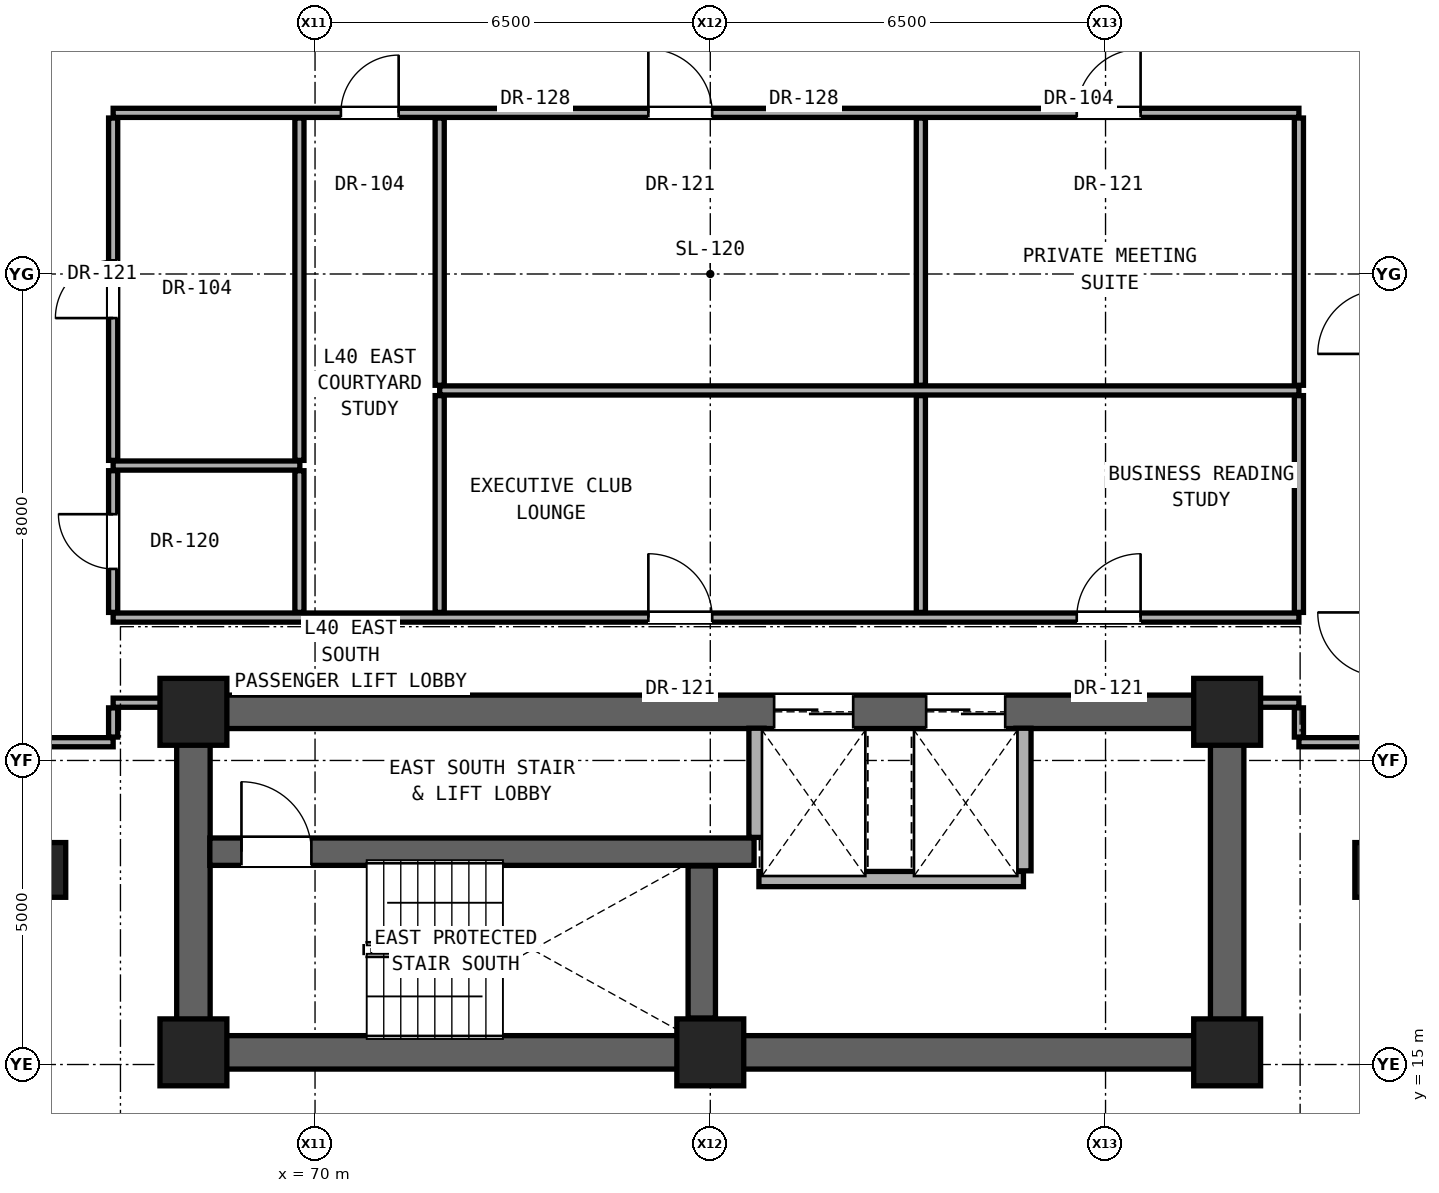
"""IFC4 building model, lengths in metres.
Left out: names, types, materials, properties, quantities, classifications, styles, units other than length and angle.
Written with IfcOpenShell. Run it as: python <this file> out.ifc"""

import sys

from ifc_helpers import new_model, si_unit, direction, frame, frame_2d, origin, origin_2d, place, context, subcontext, project, spatial, rectangle, extrude, element, fill, save


model = new_model("IFC4")
c1 = context("Model", 3, precision=1e-05, world=origin(), true_north=direction((0.0, 1.0)))
c2 = subcontext(c1, "Body", "Model", "MODEL_VIEW")
j1 = project(units=[si_unit("LENGTHUNIT", "METRE"), si_unit("PLANEANGLEUNIT", "RADIAN")], contexts=[c1])
p1 = place(None, origin())
s1 = spatial("IfcSite", under=j1, at=p1, CompositionType="ELEMENT")
p2 = place(p1, origin())
s2 = spatial("IfcBuilding", under=s1, at=p2, CompositionType="ELEMENT")
p3 = place(p2, frame((0.0, 0.0, 141.2)))
s3 = spatial("IfcBuildingStorey", under=s2, at=p3, CompositionType="ELEMENT", Elevation=141.2)
for number, where, z_axis, x_axis in (
    (1, (68.0, 15.2, 0.0), (0.0, 0.0, 1.0), (1.0, 0.0, 0.0)),
    (2, (76.5, 15.2, 0.0), (0.0, 0.0, 1.0), (1.0, 0.0, 0.0)),
    (3, (85.0, 15.2, 0.0), (0.0, 0.0, 1.0), (1.0, 0.0, 0.0)),
    (4, (68.0, 20.8, 0.0), (0.0, 0.0, 1.0), (1.0, 0.0, 0.0)),
    (5, (85.0, 20.8, 0.0), (0.0, 0.0, 1.0), (1.0, 0.0, 0.0)),
):
    element("IfcColumn", number, at=place(p3, frame(where, z_axis=z_axis, x_axis=x_axis)), inside=s3, PredefinedType="COLUMN", context=c2, shape_type="SweptSolid", body=[
        extrude(rectangle(XDim=1.1, YDim=1.1, at=origin_2d()), origin(), (0.0, 0.0, 1.0), 3.3),
    ])
for number, where, z_axis, x_axis in (
    (6, (65.6, 18.2, 0.0), (0.0, 0.0, 1.0), (1.0, 0.0, 0.0)),
    (7, (87.4, 18.2, 0.0), (0.0, 0.0, 1.0), (1.0, 0.0, 0.0)),
):
    element("IfcColumn", number, at=place(p3, frame(where, z_axis=z_axis, x_axis=x_axis)), inside=s3, PredefinedType="PILASTER", context=c2, shape_type="SweptSolid", body=[
        extrude(rectangle(XDim=0.6, YDim=0.9, at=origin_2d()), origin(), (0.0, 0.0, 1.0), 3.3),
    ])
p4 = place(p3, frame((68.0, 15.2, 0.0), z_axis=(0.0, 0.0, 1.0), x_axis=(1.0, 0.0, 0.0)))
e8 = element("IfcWall", 8, at=p4, inside=s3, PredefinedType="SHEAR", context=c2, shape_type="SweptSolid", body=[
    extrude(rectangle(XDim=17.0, YDim=0.55, at=frame_2d((8.5, 0.0))), origin(), (0.0, 0.0, 1.0), 3.08),
])
for number, where, z_axis, x_axis in (
    (9, (68.0, 15.2, 0.0), (0.0, 0.0, 1.0), (0.0, 1.0, 0.0)),
    (10, (85.0, 15.2, 0.0), (0.0, 0.0, 1.0), (0.0, 1.0, 0.0)),
):
    element("IfcWall", number, at=place(p3, frame(where, z_axis=z_axis, x_axis=x_axis)), inside=s3, PredefinedType="SHEAR", context=c2, shape_type="SweptSolid", body=[
        extrude(rectangle(XDim=5.6, YDim=0.55, at=frame_2d((2.8, 0.0))), origin(), (0.0, 0.0, 1.0), 3.08),
    ])
p5 = place(p3, frame((68.0, 20.8, 0.0), z_axis=(0.0, 0.0, 1.0), x_axis=(1.0, 0.0, 0.0)))
e11 = element("IfcWall", 11, at=p5, inside=s3, PredefinedType="SHEAR", context=c2, shape_type="SweptSolid", body=[
    extrude(rectangle(XDim=17.0, YDim=0.55, at=frame_2d((8.5, 0.0))), origin(), (0.0, 0.0, 1.0), 3.08),
])
p6 = place(p5, frame((9.55, 0.0, 0.0)))
e12 = element("IfcOpeningElement", 12, at=p6, cuts=e11, PredefinedType="OPENING", context=c2, shape_type="SweptSolid", body=[
    extrude(rectangle(XDim=1.3, YDim=2.3, at=frame_2d((0.65, 1.15))), frame((0.0, 0.285, 0.0), z_axis=(0.0, -1.0, 0.0), x_axis=(1.0, 0.0, 0.0)), (0.0, 0.0, 1.0), 0.57),
])
p7 = place(p5, frame((12.05, 0.0, 0.0)))
e13 = element("IfcOpeningElement", 13, at=p7, cuts=e11, PredefinedType="OPENING", context=c2, shape_type="SweptSolid", body=[
    extrude(rectangle(XDim=1.3, YDim=2.3, at=frame_2d((0.65, 1.15))), frame((0.0, 0.285, 0.0), z_axis=(0.0, -1.0, 0.0), x_axis=(1.0, 0.0, 0.0)), (0.0, 0.0, 1.0), 0.57),
])
p8 = place(p3, frame((77.3, 18.05, 0.0), z_axis=(0.0, 0.0, 1.0), x_axis=(1.0, 0.0, 0.0)))
e14 = element("IfcWall", 14, at=p8, inside=s3, PredefinedType="SOLIDWALL", context=c2, shape_type="SweptSolid", body=[
    extrude(rectangle(XDim=4.35, YDim=0.25, at=frame_2d((2.175, 0.0))), origin(), (0.0, 0.0, 1.0), 3.08),
])
p9 = place(p3, frame((68.27, 18.5, 0.0), z_axis=(0.0, 0.0, 1.0), x_axis=(1.0, 0.0, 0.0)))
e15 = element("IfcWall", 15, at=p9, inside=s3, PredefinedType="SHEAR", context=c2, shape_type="SweptSolid", body=[
    extrude(rectangle(XDim=8.95, YDim=0.45, at=frame_2d((4.475, 0.0))), origin(), (0.0, 0.0, 1.0), 3.08),
])
p10 = place(p9, frame((0.52, 0.0, 0.0)))
e16 = element("IfcOpeningElement", 16, at=p10, cuts=e15, PredefinedType="OPENING", context=c2, shape_type="SweptSolid", body=[
    extrude(rectangle(XDim=1.15, YDim=2.2, at=frame_2d((0.575, 1.1))), frame((0.0, 0.235, 0.0), z_axis=(0.0, -1.0, 0.0), x_axis=(1.0, 0.0, 0.0)), (0.0, 0.0, 1.0), 0.47),
])
p11 = place(p3, frame((65.32, 20.3, 0.0), z_axis=(0.0, 0.0, 1.0), x_axis=(1.0, 0.0, 0.0)))
e17 = element("IfcWall", 17, at=p11, inside=s3, PredefinedType="PARTITIONING", context=c2, shape_type="SweptSolid", body=[
    extrude(rectangle(XDim=1.36, YDim=0.15, at=frame_2d((0.68, 0.0))), origin(), (0.0, 0.0, 1.0), 3.08),
])
p12 = place(p3, frame((86.18, 20.3, 0.0), z_axis=(0.0, 0.0, 1.0), x_axis=(1.0, 0.0, 0.0)))
e18 = element("IfcWall", 18, at=p12, inside=s3, PredefinedType="PARTITIONING", context=c2, shape_type="SweptSolid", body=[
    extrude(rectangle(XDim=1.36, YDim=0.15, at=frame_2d((0.68, 0.0))), origin(), (0.0, 0.0, 1.0), 3.08),
])
p13 = place(p3, frame((66.68, 20.95, 0.0), z_axis=(0.0, 0.0, 1.0), x_axis=(1.0, 0.0, 0.0)))
e19 = element("IfcWall", 19, at=p13, inside=s3, PredefinedType="PARTITIONING", context=c2, shape_type="SweptSolid", body=[
    extrude(rectangle(XDim=1.05, YDim=0.15, at=frame_2d((0.525, 0.0))), origin(), (0.0, 0.0, 1.0), 2.472),
])
p14 = place(p3, frame((85.27, 20.95, 0.0), z_axis=(0.0, 0.0, 1.0), x_axis=(1.0, 0.0, 0.0)))
e20 = element("IfcWall", 20, at=p14, inside=s3, PredefinedType="PARTITIONING", context=c2, shape_type="SweptSolid", body=[
    extrude(rectangle(XDim=0.91, YDim=0.15, at=frame_2d((0.455, 0.0))), origin(), (0.0, 0.0, 1.0), 2.472),
])
p15 = place(p3, frame((66.68, 22.35, 0.0), z_axis=(0.0, 0.0, 1.0), x_axis=(1.0, 0.0, 0.0)))
e21 = element("IfcWall", 21, at=p15, inside=s3, PredefinedType="PARTITIONING", context=c2, shape_type="SweptSolid", body=[
    extrude(rectangle(XDim=19.5, YDim=0.15, at=frame_2d((9.75, 0.0))), origin(), (0.0, 0.0, 1.0), 2.216),
])
p16 = place(p15, frame((8.802, 0.0, 0.0)))
e22 = element("IfcOpeningElement", 22, at=p16, cuts=e21, PredefinedType="OPENING", context=c2, shape_type="SweptSolid", body=[
    extrude(rectangle(XDim=1.05, YDim=2.2, at=frame_2d((0.525, 1.1))), frame((0.0, 0.085, 0.0), z_axis=(0.0, -1.0, 0.0), x_axis=(1.0, 0.0, 0.0)), (0.0, 0.0, 1.0), 0.17),
])
p17 = place(p15, frame((15.846, 0.0, 0.0)))
e23 = element("IfcOpeningElement", 23, at=p17, cuts=e21, PredefinedType="OPENING", context=c2, shape_type="SweptSolid", body=[
    extrude(rectangle(XDim=1.05, YDim=2.2, at=frame_2d((0.525, 1.1))), frame((0.0, 0.085, 0.0), z_axis=(0.0, -1.0, 0.0), x_axis=(1.0, 0.0, 0.0)), (0.0, 0.0, 1.0), 0.17),
])
p18 = place(p3, frame((66.68, 24.85, 0.0), z_axis=(0.0, 0.0, 1.0), x_axis=(1.0, 0.0, 0.0)))
e24 = element("IfcWall", 24, at=p18, inside=s3, PredefinedType="PARTITIONING", context=c2, shape_type="SweptSolid", body=[
    extrude(rectangle(XDim=3.07, YDim=0.15, at=frame_2d((1.535, 0.0))), origin(), (0.0, 0.0, 1.0), 2.216),
])
p19 = place(p3, frame((72.05, 26.085, 0.0), z_axis=(0.0, 0.0, 1.0), x_axis=(1.0, 0.0, 0.0)))
e25 = element("IfcWall", 25, at=p19, inside=s3, PredefinedType="PARTITIONING", context=c2, shape_type="SweptSolid", body=[
    extrude(rectangle(XDim=14.13, YDim=0.15, at=frame_2d((7.065, 0.0))), origin(), (0.0, 0.0, 1.0), 2.216),
])
p20 = place(p3, frame((66.68, 30.65, 0.0), z_axis=(0.0, 0.0, 1.0), x_axis=(1.0, 0.0, 0.0)))
e26 = element("IfcWall", 26, at=p20, inside=s3, PredefinedType="PARTITIONING", context=c2, shape_type="SweptSolid", body=[
    extrude(rectangle(XDim=19.5, YDim=0.15, at=frame_2d((9.75, 0.0))), origin(), (0.0, 0.0, 1.0), 2.216),
])
p21 = place(p20, frame((3.745, 0.0, 0.0)))
e27 = element("IfcOpeningElement", 27, at=p21, cuts=e26, PredefinedType="OPENING", context=c2, shape_type="SweptSolid", body=[
    extrude(rectangle(XDim=0.95, YDim=2.15, at=frame_2d((0.475, 1.075))), frame((0.0, 0.085, 0.0), z_axis=(0.0, -1.0, 0.0), x_axis=(1.0, 0.0, 0.0)), (0.0, 0.0, 1.0), 0.17),
])
p22 = place(p20, frame((8.802, 0.0, 0.0)))
e28 = element("IfcOpeningElement", 28, at=p22, cuts=e26, PredefinedType="OPENING", context=c2, shape_type="SweptSolid", body=[
    extrude(rectangle(XDim=1.05, YDim=2.2, at=frame_2d((0.525, 1.1))), frame((0.0, 0.085, 0.0), z_axis=(0.0, -1.0, 0.0), x_axis=(1.0, 0.0, 0.0)), (0.0, 0.0, 1.0), 0.17),
])
p23 = place(p20, frame((15.846, 0.0, 0.0)))
e29 = element("IfcOpeningElement", 29, at=p23, cuts=e26, PredefinedType="OPENING", context=c2, shape_type="SweptSolid", body=[
    extrude(rectangle(XDim=1.05, YDim=2.2, at=frame_2d((0.525, 1.1))), frame((0.0, 0.085, 0.0), z_axis=(0.0, -1.0, 0.0), x_axis=(1.0, 0.0, 0.0)), (0.0, 0.0, 1.0), 0.17),
])
p24 = place(p3, frame((66.68, 20.385, 0.0), z_axis=(0.0, 0.0, 1.0), x_axis=(0.0, 1.0, 0.0)))
e30 = element("IfcWall", 30, at=p24, inside=s3, PredefinedType="PARTITIONING", context=c2, shape_type="SweptSolid", body=[
    extrude(rectangle(XDim=0.48, YDim=0.15, at=frame_2d((0.24, 0.0))), origin(), (0.0, 0.0, 1.0), 2.472),
])
p25 = place(p3, frame((66.68, 22.435, 0.0), z_axis=(0.0, 0.0, 1.0), x_axis=(0.0, 1.0, 0.0)))
e31 = element("IfcWall", 31, at=p25, inside=s3, PredefinedType="PARTITIONING", context=c2, shape_type="SweptSolid", body=[
    extrude(rectangle(XDim=2.33, YDim=0.15, at=frame_2d((1.165, 0.0))), origin(), (0.0, 0.0, 1.0), 3.08),
])
p26 = place(p25, frame((0.715, 0.0, 0.0)))
e32 = element("IfcOpeningElement", 32, at=p26, cuts=e31, PredefinedType="OPENING", context=c2, shape_type="SweptSolid", body=[
    extrude(rectangle(XDim=0.9, YDim=2.1, at=frame_2d((0.45, 1.05))), frame((0.0, 0.085, 0.0), z_axis=(0.0, -1.0, 0.0), x_axis=(1.0, 0.0, 0.0)), (0.0, 0.0, 1.0), 0.17),
])
p27 = place(p3, frame((66.68, 24.935, 0.0), z_axis=(0.0, 0.0, 1.0), x_axis=(0.0, 1.0, 0.0)))
e33 = element("IfcWall", 33, at=p27, inside=s3, PredefinedType="PARTITIONING", context=c2, shape_type="SweptSolid", body=[
    extrude(rectangle(XDim=5.63, YDim=0.15, at=frame_2d((2.815, 0.0))), origin(), (0.0, 0.0, 1.0), 2.376),
])
p28 = place(p27, frame((2.34, 0.0, 0.0)))
e34 = element("IfcOpeningElement", 34, at=p28, cuts=e33, PredefinedType="OPENING", context=c2, shape_type="SweptSolid", body=[
    extrude(rectangle(XDim=0.95, YDim=2.15, at=frame_2d((0.475, 1.075))), frame((0.0, 0.085, 0.0), z_axis=(0.0, -1.0, 0.0), x_axis=(1.0, 0.0, 0.0)), (0.0, 0.0, 1.0), 0.17),
])
p29 = place(p3, frame((69.743, 22.435, 0.0), z_axis=(0.0, 0.0, 1.0), x_axis=(0.0, 1.0, 0.0)))
e35 = element("IfcWall", 35, at=p29, inside=s3, PredefinedType="PARTITIONING", context=c2, shape_type="SweptSolid", body=[
    extrude(rectangle(XDim=2.33, YDim=0.15, at=frame_2d((1.165, 0.0))), origin(), (0.0, 0.0, 1.0), 3.08),
])
p30 = place(p3, frame((69.743, 24.935, 0.0), z_axis=(0.0, 0.0, 1.0), x_axis=(0.0, 1.0, 0.0)))
e36 = element("IfcWall", 36, at=p30, inside=s3, PredefinedType="PARTITIONING", context=c2, shape_type="SweptSolid", body=[
    extrude(rectangle(XDim=5.63, YDim=0.15, at=frame_2d((2.815, 0.0))), origin(), (0.0, 0.0, 1.0), 2.216),
])
p31 = place(p3, frame((72.05, 22.435, 0.0), z_axis=(0.0, 0.0, 1.0), x_axis=(0.0, 1.0, 0.0)))
e37 = element("IfcWall", 37, at=p31, inside=s3, PredefinedType="PARTITIONING", context=c2, shape_type="SweptSolid", body=[
    extrude(rectangle(XDim=3.565, YDim=0.15, at=frame_2d((1.782, 0.0))), origin(), (0.0, 0.0, 1.0), 3.08),
])
p32 = place(p3, frame((72.05, 26.17, 0.0), z_axis=(0.0, 0.0, 1.0), x_axis=(0.0, 1.0, 0.0)))
e38 = element("IfcWall", 38, at=p32, inside=s3, PredefinedType="PARTITIONING", context=c2, shape_type="SweptSolid", body=[
    extrude(rectangle(XDim=4.395, YDim=0.15, at=frame_2d((2.198, 0.0))), origin(), (0.0, 0.0, 1.0), 2.216),
])
p33 = place(p3, frame((76.36, 15.765, 0.0), z_axis=(0.0, 0.0, 1.0), x_axis=(0.0, 1.0, 0.0)))
e39 = element("IfcWall", 39, at=p33, inside=s3, PredefinedType="SHEAR", context=c2, shape_type="SweptSolid", body=[
    extrude(rectangle(XDim=2.5, YDim=0.45, at=frame_2d((1.25, 0.0))), origin(), (0.0, 0.0, 1.0), 3.08),
])
p34 = place(p3, frame((77.26, 18.735, 0.0), z_axis=(0.0, 0.0, 1.0), x_axis=(0.0, 1.0, 0.0)))
e40 = element("IfcWall", 40, at=p34, inside=s3, PredefinedType="SOLIDWALL", context=c2, shape_type="SweptSolid", body=[
    extrude(rectangle(XDim=1.795, YDim=0.25, at=frame_2d((0.897, 0.0))), origin(), (0.0, 0.0, 1.0), 3.08),
])
p35 = place(p3, frame((79.963, 22.435, 0.0), z_axis=(0.0, 0.0, 1.0), x_axis=(0.0, 1.0, 0.0)))
e41 = element("IfcWall", 41, at=p35, inside=s3, PredefinedType="PARTITIONING", context=c2, shape_type="SweptSolid", body=[
    extrude(rectangle(XDim=3.565, YDim=0.15, at=frame_2d((1.782, 0.0))), origin(), (0.0, 0.0, 1.0), 3.08),
])
p36 = place(p3, frame((79.963, 26.17, 0.0), z_axis=(0.0, 0.0, 1.0), x_axis=(0.0, 1.0, 0.0)))
e42 = element("IfcWall", 42, at=p36, inside=s3, PredefinedType="PARTITIONING", context=c2, shape_type="SweptSolid", body=[
    extrude(rectangle(XDim=4.395, YDim=0.15, at=frame_2d((2.198, 0.0))), origin(), (0.0, 0.0, 1.0), 2.216),
])
p37 = place(p3, frame((81.65, 18.185, 0.0), z_axis=(0.0, 0.0, 1.0), x_axis=(0.0, 1.0, 0.0)))
e43 = element("IfcWall", 43, at=p37, inside=s3, PredefinedType="SOLIDWALL", context=c2, shape_type="SweptSolid", body=[
    extrude(rectangle(XDim=2.345, YDim=0.25, at=frame_2d((1.172, 0.0))), origin(), (0.0, 0.0, 1.0), 3.08),
])
p38 = place(p3, frame((86.18, 20.385, 0.0), z_axis=(0.0, 0.0, 1.0), x_axis=(0.0, 1.0, 0.0)))
e44 = element("IfcWall", 44, at=p38, inside=s3, PredefinedType="PARTITIONING", context=c2, shape_type="SweptSolid", body=[
    extrude(rectangle(XDim=0.48, YDim=0.15, at=frame_2d((0.24, 0.0))), origin(), (0.0, 0.0, 1.0), 2.472),
])
p39 = place(p3, frame((86.18, 22.435, 0.0), z_axis=(0.0, 0.0, 1.0), x_axis=(0.0, 1.0, 0.0)))
e45 = element("IfcWall", 45, at=p39, inside=s3, PredefinedType="PARTITIONING", context=c2, shape_type="SweptSolid", body=[
    extrude(rectangle(XDim=3.565, YDim=0.15, at=frame_2d((1.782, 0.0))), origin(), (0.0, 0.0, 1.0), 3.08),
])
p40 = place(p3, frame((86.18, 26.17, 0.0), z_axis=(0.0, 0.0, 1.0), x_axis=(0.0, 1.0, 0.0)))
e46 = element("IfcWall", 46, at=p40, inside=s3, PredefinedType="PARTITIONING", context=c2, shape_type="SweptSolid", body=[
    extrude(rectangle(XDim=4.395, YDim=0.15, at=frame_2d((2.198, 0.0))), origin(), (0.0, 0.0, 1.0), 2.376),
])
p41 = place(p10, origin())
e47 = element("IfcDoor", 47, at=p41, inside=s3, OperationType="SINGLE_SWING_LEFT", PredefinedType="DOOR", context=c2, shape_type="SweptSolid", body=[
    extrude(rectangle(XDim=1.15, YDim=2.2, at=frame_2d((0.575, 1.1))), frame((0.0, 0.025, 0.0), z_axis=(0.0, -1.0, 0.0), x_axis=(1.0, 0.0, 0.0)), (0.0, 0.0, 1.0), 0.05),
])
fill(e16, e47)
p42 = place(p26, origin())
e48 = element("IfcDoor", 48, at=p42, inside=s3, OperationType="SINGLE_SWING_RIGHT", PredefinedType="DOOR", context=c2, shape_type="SweptSolid", body=[
    extrude(rectangle(XDim=0.9, YDim=2.1, at=frame_2d((0.45, 1.05))), frame((0.0, 0.025, 0.0), z_axis=(0.0, -1.0, 0.0), x_axis=(1.0, 0.0, 0.0)), (0.0, 0.0, 1.0), 0.05),
])
fill(e32, e48)
p43 = place(p28, origin())
e49 = element("IfcDoor", 49, at=p43, inside=s3, OperationType="SINGLE_SWING_LEFT", PredefinedType="DOOR", context=c2, shape_type="SweptSolid", body=[
    extrude(rectangle(XDim=0.95, YDim=2.15, at=frame_2d((0.475, 1.075))), frame((0.0, 0.025, 0.0), z_axis=(0.0, -1.0, 0.0), x_axis=(1.0, 0.0, 0.0)), (0.0, 0.0, 1.0), 0.05),
])
fill(e34, e49)
p44 = place(p21, origin())
e50 = element("IfcDoor", 50, at=p44, inside=s3, OperationType="SINGLE_SWING_RIGHT", PredefinedType="DOOR", context=c2, shape_type="SweptSolid", body=[
    extrude(rectangle(XDim=0.95, YDim=2.15, at=frame_2d((0.475, 1.075))), frame((0.0, 0.025, 0.0), z_axis=(0.0, -1.0, 0.0), x_axis=(1.0, 0.0, 0.0)), (0.0, 0.0, 1.0), 0.05),
])
fill(e27, e50)
p45 = place(p16, origin())
e51 = element("IfcDoor", 51, at=p45, inside=s3, OperationType="SINGLE_SWING_LEFT", PredefinedType="DOOR", context=c2, shape_type="SweptSolid", body=[
    extrude(rectangle(XDim=1.05, YDim=2.2, at=frame_2d((0.525, 1.1))), frame((0.0, 0.025, 0.0), z_axis=(0.0, -1.0, 0.0), x_axis=(1.0, 0.0, 0.0)), (0.0, 0.0, 1.0), 0.05),
])
fill(e22, e51)
p46 = place(p17, origin())
e52 = element("IfcDoor", 52, at=p46, inside=s3, OperationType="SINGLE_SWING_RIGHT", PredefinedType="DOOR", context=c2, shape_type="SweptSolid", body=[
    extrude(rectangle(XDim=1.05, YDim=2.2, at=frame_2d((0.525, 1.1))), frame((0.0, 0.025, 0.0), z_axis=(0.0, -1.0, 0.0), x_axis=(1.0, 0.0, 0.0)), (0.0, 0.0, 1.0), 0.05),
])
fill(e23, e52)
p47 = place(p22, origin())
e53 = element("IfcDoor", 53, at=p47, inside=s3, OperationType="SINGLE_SWING_LEFT", PredefinedType="DOOR", context=c2, shape_type="SweptSolid", body=[
    extrude(rectangle(XDim=1.05, YDim=2.2, at=frame_2d((0.525, 1.1))), frame((0.0, 0.025, 0.0), z_axis=(0.0, -1.0, 0.0), x_axis=(1.0, 0.0, 0.0)), (0.0, 0.0, 1.0), 0.05),
])
fill(e28, e53)
p48 = place(p23, origin())
e54 = element("IfcDoor", 54, at=p48, inside=s3, OperationType="SINGLE_SWING_RIGHT", PredefinedType="DOOR", context=c2, shape_type="SweptSolid", body=[
    extrude(rectangle(XDim=1.05, YDim=2.2, at=frame_2d((0.525, 1.1))), frame((0.0, 0.025, 0.0), z_axis=(0.0, -1.0, 0.0), x_axis=(1.0, 0.0, 0.0)), (0.0, 0.0, 1.0), 0.05),
])
fill(e29, e54)
p49 = place(p6, origin())
e55 = element("IfcDoor", 55, at=p49, inside=s3, OperationType="DOUBLE_DOOR_SLIDING", PredefinedType="DOOR", context=c2, shape_type="SweptSolid", body=[
    extrude(rectangle(XDim=1.3, YDim=2.3, at=frame_2d((0.65, 1.15))), frame((0.0, 0.025, 0.0), z_axis=(0.0, -1.0, 0.0), x_axis=(1.0, 0.0, 0.0)), (0.0, 0.0, 1.0), 0.05),
])
fill(e12, e55)
p50 = place(p7, origin())
e56 = element("IfcDoor", 56, at=p50, inside=s3, OperationType="DOUBLE_DOOR_SLIDING", PredefinedType="DOOR", context=c2, shape_type="SweptSolid", body=[
    extrude(rectangle(XDim=1.3, YDim=2.3, at=frame_2d((0.65, 1.15))), frame((0.0, 0.025, 0.0), z_axis=(0.0, -1.0, 0.0), x_axis=(1.0, 0.0, 0.0)), (0.0, 0.0, 1.0), 0.05),
])
fill(e13, e56)
save(model, sys.argv[1])
